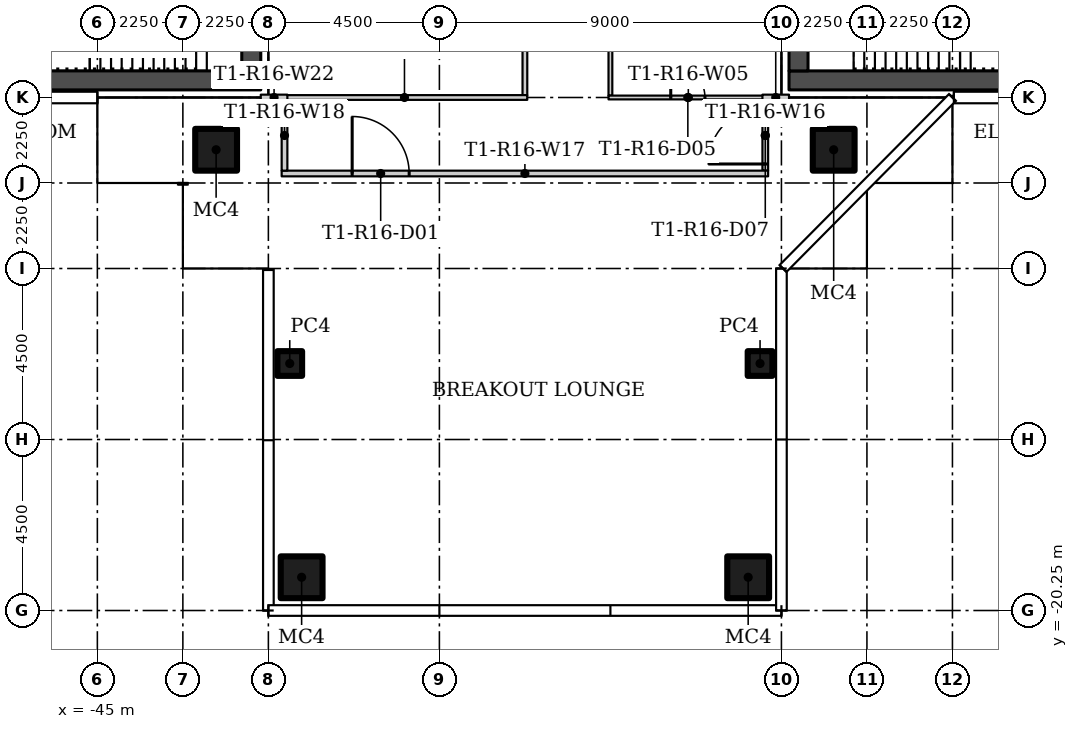
"""IFC4 building model, lengths in metres.
Left out: names, types, materials, properties, quantities, classifications, styles, units other than length and angle.
Written with IfcOpenShell. Run it as: python <this file> out.ifc"""

import sys

from ifc_helpers import new_model, si_unit, direction, frame, frame_2d, origin, origin_2d, place, context, subcontext, project, spatial, rectangle, hollow_rectangle, extrude, element, fill, save


model = new_model("IFC4")
c1 = context("Model", 3, precision=1e-05, world=origin(), true_north=direction((0.0, 1.0)))
c2 = subcontext(c1, "Body", "Model", "MODEL_VIEW")
j1 = project(units=[si_unit("LENGTHUNIT", "METRE"), si_unit("PLANEANGLEUNIT", "RADIAN")], contexts=[c1])
p1 = place(None, origin())
s1 = spatial("IfcSite", under=j1, at=p1, CompositionType="ELEMENT")
p2 = place(p1, origin())
s2 = spatial("IfcBuilding", under=s1, at=p2, CompositionType="ELEMENT")
p3 = place(p2, frame((0.0, 0.0, 146.7)))
s3 = spatial("IfcBuildingStorey", under=s2, at=p3, CompositionType="ELEMENT", Elevation=146.7)
for number, where in (
    (1, (-25.625, -8.125, 0.0)),
    (2, (-41.875, -8.125, 0.0)),
):
    element("IfcColumn", number, at=place(p3, frame(where)), inside=s3, PredefinedType="COLUMN", context=c2, shape_type="SweptSolid", body=[
        extrude(hollow_rectangle(XDim=1.1, YDim=1.1, WallThickness=0.04, at=origin_2d()), origin(), (0.0, 0.0, 1.0), 3.55),
    ])
p4 = place(p3, frame((-39.938, -13.75, 0.0)))
e3 = element("IfcColumn", 3, at=p4, inside=s3, PredefinedType="COLUMN", context=c2, shape_type="SweptSolid", body=[
    extrude(hollow_rectangle(XDim=0.65, YDim=0.65, WallThickness=0.02, at=origin_2d()), origin(), (0.0, 0.0, 1.0), 3.55),
])
p5 = place(p3, frame((-39.625, -19.375, 0.0)))
e4 = element("IfcColumn", 4, at=p5, inside=s3, PredefinedType="COLUMN", context=c2, shape_type="SweptSolid", body=[
    extrude(hollow_rectangle(XDim=1.1, YDim=1.1, WallThickness=0.04, at=origin_2d()), origin(), (0.0, 0.0, 1.0), 3.55),
])
p6 = place(p3, frame((-27.562, -13.75, 0.0)))
e5 = element("IfcColumn", 5, at=p6, inside=s3, PredefinedType="COLUMN", context=c2, shape_type="SweptSolid", body=[
    extrude(hollow_rectangle(XDim=0.65, YDim=0.65, WallThickness=0.02, at=origin_2d()), origin(), (0.0, 0.0, 1.0), 3.55),
])
p7 = place(p3, frame((-27.875, -19.375, 0.0)))
e6 = element("IfcColumn", 6, at=p7, inside=s3, PredefinedType="COLUMN", context=c2, shape_type="SweptSolid", body=[
    extrude(hollow_rectangle(XDim=1.1, YDim=1.1, WallThickness=0.04, at=origin_2d()), origin(), (0.0, 0.0, 1.0), 3.55),
])
p8 = place(p3, frame((-31.5, -0.0, 0.0), z_axis=(0.0, 0.0, 1.0), x_axis=(0.0, -1.0, 0.0)))
e7 = element("IfcWall", 7, at=p8, inside=s3, PredefinedType="PARTITIONING", context=c2, shape_type="SweptSolid", body=[
    extrude(rectangle(XDim=6.7, YDim=0.1, at=frame_2d((3.35, 0.0))), origin(), (0.0, 0.0, 1.0), 3.55),
])
p9 = place(p3, frame((-31.55, -6.75, 0.0)))
e8 = element("IfcWall", 8, at=p9, inside=s3, PredefinedType="PARTITIONING", context=c2, shape_type="SweptSolid", body=[
    extrude(rectangle(XDim=4.2, YDim=0.1, at=frame_2d((2.1, 0.0))), origin(), (0.0, 0.0, 1.0), 3.55),
])
p10 = place(p9, frame((1.638, 0.0, 0.0)))
e9 = element("IfcOpeningElement", 9, at=p10, cuts=e8, PredefinedType="OPENING", context=c2, shape_type="SweptSolid", body=[
    extrude(rectangle(XDim=0.9, YDim=2.1, at=frame_2d((0.45, 1.05))), frame((0.0, 0.06, 0.0), z_axis=(0.0, -1.0, 0.0), x_axis=(1.0, 0.0, 0.0)), (0.0, 0.0, 1.0), 0.12),
])
p11 = place(p3, frame((-33.75, -6.688, 0.0), z_axis=(0.0, 0.0, 1.0), x_axis=(0.0, 1.0, 0.0)))
e10 = element("IfcWall", 10, at=p11, inside=s3, PredefinedType="PARTITIONING", context=c2, shape_type="SweptSolid", body=[
    extrude(rectangle(XDim=6.675, YDim=0.125, at=frame_2d((3.337, 0.0))), origin(), (0.0, 0.0, 1.0), 3.55),
])
p12 = place(p11, frame((2.887, 0.0, 0.0)))
e11 = element("IfcOpeningElement", 11, at=p12, cuts=e10, PredefinedType="OPENING", context=c2, shape_type="SweptSolid", body=[
    extrude(rectangle(XDim=0.9, YDim=2.1, at=frame_2d((0.45, 1.05))), frame((0.0, 0.073, 0.0), z_axis=(0.0, -1.0, 0.0), x_axis=(1.0, 0.0, 0.0)), (0.0, 0.0, 1.0), 0.145),
])
p13 = place(p3, frame((-40.15, -6.75, 0.0)))
e12 = element("IfcWall", 12, at=p13, inside=s3, PredefinedType="PARTITIONING", context=c2, shape_type="SweptSolid", body=[
    extrude(rectangle(XDim=6.463, YDim=0.125, at=frame_2d((3.231, 0.0))), origin(), (0.0, 0.0, 1.0), 3.55),
])
p14 = place(p3, frame((-27.425, -8.675, 0.0), z_axis=(0.0, 0.0, 1.0), x_axis=(0.0, 1.0, 0.0)))
e13 = element("IfcWall", 13, at=p14, inside=s3, PredefinedType="PARTITIONING", context=c2, shape_type="SweptSolid", body=[
    extrude(rectangle(XDim=1.85, YDim=0.15, at=frame_2d((0.925, 0.0))), origin(), (0.0, 0.0, 1.0), 3.55),
])
p15 = place(p14, frame((0.175, 0.0, 0.0)))
e14 = element("IfcOpeningElement", 14, at=p15, cuts=e13, PredefinedType="OPENING", context=c2, shape_type="SweptSolid", body=[
    extrude(rectangle(XDim=1.5, YDim=2.1, at=frame_2d((0.75, 1.05))), frame((0.0, 0.085, 0.0), z_axis=(0.0, -1.0, 0.0), x_axis=(1.0, 0.0, 0.0)), (0.0, 0.0, 1.0), 0.17),
])
p16 = place(p3, frame((-40.15, -8.75, 0.0)))
e15 = element("IfcWall", 15, at=p16, inside=s3, PredefinedType="PARTITIONING", context=c2, shape_type="SweptSolid", body=[
    extrude(rectangle(XDim=12.8, YDim=0.15, at=frame_2d((6.4, 0.0))), origin(), (0.0, 0.0, 1.0), 3.55),
])
p17 = place(p16, frame((1.855, 0.0, 0.0)))
e16 = element("IfcOpeningElement", 16, at=p17, cuts=e15, PredefinedType="OPENING", context=c2, shape_type="SweptSolid", body=[
    extrude(rectangle(XDim=1.5, YDim=2.1, at=frame_2d((0.75, 1.05))), frame((0.0, 0.085, 0.0), z_axis=(0.0, -1.0, 0.0), x_axis=(1.0, 0.0, 0.0)), (0.0, 0.0, 1.0), 0.17),
])
p18 = place(p3, frame((-40.075, -6.825, 0.0), z_axis=(0.0, 0.0, 1.0), x_axis=(0.0, -1.0, 0.0)))
e17 = element("IfcWall", 17, at=p18, inside=s3, PredefinedType="PARTITIONING", context=c2, shape_type="SweptSolid", body=[
    extrude(rectangle(XDim=1.85, YDim=0.15, at=frame_2d((0.925, 0.0))), origin(), (0.0, 0.0, 1.0), 3.55),
])
for number, where in (
    (18, (-40.7, -6.75, 0.0)),
    (19, (-27.5, -6.75, 0.0)),
):
    element("IfcWall", number, at=place(p3, frame(where)), inside=s3, PredefinedType="PARTITIONING", context=c2, shape_type="SweptSolid", body=[
        extrude(rectangle(XDim=0.7, YDim=0.15, at=frame_2d((0.35, 0.0))), origin(), (0.0, 0.0, 1.0), 3.55),
    ])
p19 = place(p3, frame((-26.8, -6.3, 0.0)))
e20 = element("IfcWall", 20, at=p19, inside=s3, PredefinedType="SHEAR", context=c2, shape_type="SweptSolid", body=[
    extrude(rectangle(XDim=13.1, YDim=0.5, at=frame_2d((6.55, 0.0))), origin(), (0.0, 0.0, 1.0), 3.55),
])
p20 = place(p3, frame((-26.55, 6.05, 0.0), z_axis=(0.0, 0.0, 1.0), x_axis=(0.0, -1.0, 0.0)))
e21 = element("IfcWall", 21, at=p20, inside=s3, PredefinedType="SHEAR", context=c2, shape_type="SweptSolid", body=[
    extrude(rectangle(XDim=12.1, YDim=0.5, at=frame_2d((6.05, 0.0))), origin(), (0.0, 0.0, 1.0), 3.55),
])
p21 = place(p20, frame((3.9, 0.0, 0.0)))
e22 = element("IfcOpeningElement", 22, at=p21, cuts=e21, PredefinedType="OPENING", context=c2, shape_type="SweptSolid", body=[
    extrude(rectangle(XDim=1.8, YDim=2.4, at=frame_2d((0.9, 1.2))), frame((0.0, 0.26, 0.0), z_axis=(0.0, -1.0, 0.0), x_axis=(1.0, 0.0, 0.0)), (0.0, 0.0, 1.0), 0.52),
])
p22 = place(p3, frame((-40.7, -6.3, 0.0), z_axis=(0.0, 0.0, 1.0), x_axis=(-1.0, 0.0, 0.0)))
e23 = element("IfcWall", 23, at=p22, inside=s3, PredefinedType="SHEAR", context=c2, shape_type="SweptSolid", body=[
    extrude(rectangle(XDim=13.1, YDim=0.5, at=frame_2d((6.55, 0.0))), origin(), (0.0, 0.0, 1.0), 3.55),
])
p23 = place(p3, frame((-40.95, -6.05, 0.0), z_axis=(0.0, 0.0, 1.0), x_axis=(0.0, 1.0, 0.0)))
e24 = element("IfcWall", 24, at=p23, inside=s3, PredefinedType="SHEAR", context=c2, shape_type="SweptSolid", body=[
    extrude(rectangle(XDim=12.1, YDim=0.5, at=frame_2d((6.05, 0.0))), origin(), (0.0, 0.0, 1.0), 3.55),
])
p24 = place(p23, frame((6.4, 0.0, 0.0)))
e25 = element("IfcOpeningElement", 25, at=p24, cuts=e24, PredefinedType="OPENING", context=c2, shape_type="SweptSolid", body=[
    extrude(rectangle(XDim=1.8, YDim=2.4, at=frame_2d((0.9, 1.2))), frame((0.0, 0.26, 0.0), z_axis=(0.0, -1.0, 0.0), x_axis=(1.0, 0.0, 0.0)), (0.0, 0.0, 1.0), 0.52),
])
p25 = place(p17, origin())
e26 = element("IfcDoor", 26, at=p25, inside=s3, OperationType="DOUBLE_DOOR_SINGLE_SWING", PredefinedType="DOOR", context=c2, shape_type="SweptSolid", body=[
    extrude(rectangle(XDim=1.5, YDim=2.1, at=frame_2d((0.75, 1.05))), frame((0.0, 0.025, 0.0), z_axis=(0.0, -1.0, 0.0), x_axis=(1.0, 0.0, 0.0)), (0.0, 0.0, 1.0), 0.05),
])
fill(e16, e26)
p26 = place(p10, origin())
e27 = element("IfcDoor", 27, at=p26, inside=s3, OperationType="SINGLE_SWING_RIGHT", PredefinedType="DOOR", context=c2, shape_type="SweptSolid", body=[
    extrude(rectangle(XDim=0.9, YDim=2.1, at=frame_2d((0.45, 1.05))), frame((0.0, 0.025, 0.0), z_axis=(0.0, -1.0, 0.0), x_axis=(1.0, 0.0, 0.0)), (0.0, 0.0, 1.0), 0.05),
])
fill(e9, e27)
p27 = place(p15, origin())
e28 = element("IfcDoor", 28, at=p27, inside=s3, OperationType="DOUBLE_DOOR_SINGLE_SWING", PredefinedType="DOOR", context=c2, shape_type="SweptSolid", body=[
    extrude(rectangle(XDim=1.5, YDim=2.1, at=frame_2d((0.75, 1.05))), frame((0.0, 0.025, 0.0), z_axis=(0.0, -1.0, 0.0), x_axis=(1.0, 0.0, 0.0)), (0.0, 0.0, 1.0), 0.05),
])
fill(e14, e28)
save(model, sys.argv[1])
